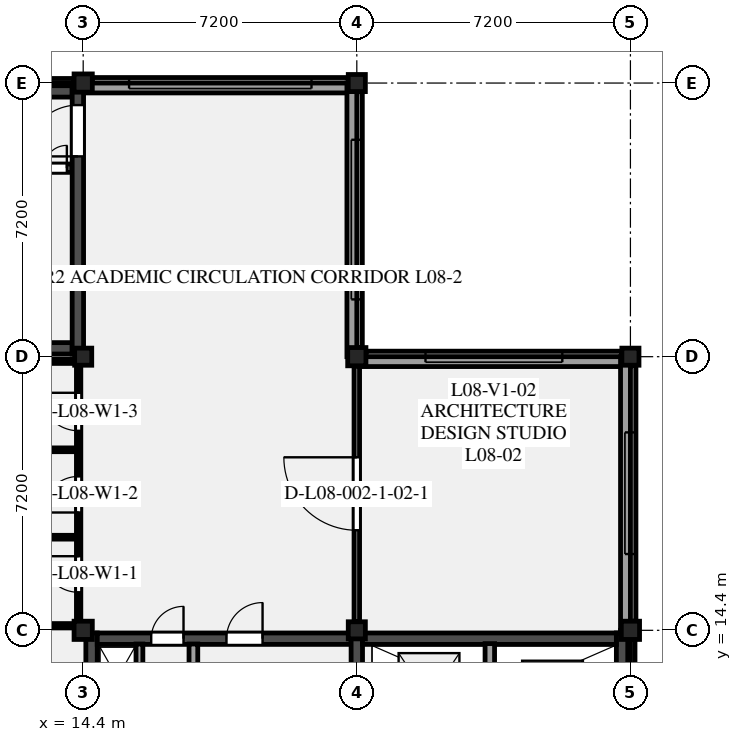
"""IFC4 building model, lengths in metres.
Left out: names, types, materials, properties, quantities, classifications, styles, units other than length and angle.
Written with IfcOpenShell. Run it as: python <this file> out.ifc"""

import sys

from ifc_helpers import new_model, si_unit, direction, frame, frame_2d, origin, origin_2d, place, context, subcontext, project, spatial, rectangle, extrude, element, fill, save


model = new_model("IFC4")
c1 = context("Model", 3, precision=1e-05, world=origin(), true_north=direction((0.0, 1.0)))
c2 = subcontext(c1, "Body", "Model", "MODEL_VIEW")
j1 = project(units=[si_unit("LENGTHUNIT", "METRE"), si_unit("PLANEANGLEUNIT", "RADIAN")], contexts=[c1])
p1 = place(None, origin())
s1 = spatial("IfcSite", under=j1, at=p1, CompositionType="ELEMENT")
p2 = place(p1, origin())
s2 = spatial("IfcBuilding", under=s1, at=p2, CompositionType="ELEMENT")
p3 = place(p2, frame((0.0, 0.0, 34.5)))
s3 = spatial("IfcBuildingStorey", under=s2, at=p3, CompositionType="ELEMENT", Elevation=34.5)
p4 = place(p3, frame((14.4, 14.4, 0.0), z_axis=(0.0, 0.0, 1.0), x_axis=(1.0, 0.0, 0.0)))
e1 = element("IfcColumn", 1, at=p4, inside=s3, PredefinedType="COLUMN", context=c2, shape_type="SweptSolid", body=[
    extrude(rectangle(XDim=0.48, YDim=0.48, at=origin_2d()), origin(), (0.0, 0.0, 1.0), 3.695),
])
p5 = place(p3, frame((14.4, 21.6, 0.0), z_axis=(0.0, 0.0, 1.0), x_axis=(1.0, 0.0, 0.0)))
e2 = element("IfcColumn", 2, at=p5, inside=s3, PredefinedType="COLUMN", context=c2, shape_type="SweptSolid", body=[
    extrude(rectangle(XDim=0.45, YDim=0.45, at=origin_2d()), origin(), (0.0, 0.0, 1.0), 3.695),
])
p6 = place(p3, frame((14.4, 28.8, 0.0), z_axis=(0.0, 0.0, 1.0), x_axis=(1.0, 0.0, 0.0)))
e3 = element("IfcColumn", 3, at=p6, inside=s3, PredefinedType="COLUMN", context=c2, shape_type="SweptSolid", body=[
    extrude(rectangle(XDim=0.48, YDim=0.48, at=origin_2d()), origin(), (0.0, 0.0, 1.0), 3.695),
])
p7 = place(p3, frame((21.6, 14.4, 0.0), z_axis=(0.0, 0.0, 1.0), x_axis=(1.0, 0.0, 0.0)))
e4 = element("IfcColumn", 4, at=p7, inside=s3, PredefinedType="COLUMN", context=c2, shape_type="SweptSolid", body=[
    extrude(rectangle(XDim=0.45, YDim=0.45, at=origin_2d()), origin(), (0.0, 0.0, 1.0), 3.695),
])
p8 = place(p3, frame((21.6, 21.6, 0.0), z_axis=(0.0, 0.0, 1.0), x_axis=(1.0, 0.0, 0.0)))
e5 = element("IfcColumn", 5, at=p8, inside=s3, PredefinedType="COLUMN", context=c2, shape_type="SweptSolid", body=[
    extrude(rectangle(XDim=0.48, YDim=0.48, at=origin_2d()), origin(), (0.0, 0.0, 1.0), 3.695),
])
p9 = place(p3, frame((21.6, 28.8, 0.0), z_axis=(0.0, 0.0, 1.0), x_axis=(1.0, 0.0, 0.0)))
e6 = element("IfcColumn", 6, at=p9, inside=s3, PredefinedType="COLUMN", context=c2, shape_type="SweptSolid", body=[
    extrude(rectangle(XDim=0.45, YDim=0.45, at=origin_2d()), origin(), (0.0, 0.0, 1.0), 3.695),
])
p10 = place(p3, frame((28.8, 14.4, 0.0), z_axis=(0.0, 0.0, 1.0), x_axis=(1.0, 0.0, 0.0)))
e7 = element("IfcColumn", 7, at=p10, inside=s3, PredefinedType="COLUMN", context=c2, shape_type="SweptSolid", body=[
    extrude(rectangle(XDim=0.48, YDim=0.48, at=origin_2d()), origin(), (0.0, 0.0, 1.0), 3.695),
])
p11 = place(p3, frame((28.8, 21.6, 0.0), z_axis=(0.0, 0.0, 1.0), x_axis=(1.0, 0.0, 0.0)))
e8 = element("IfcColumn", 8, at=p11, inside=s3, PredefinedType="COLUMN", context=c2, shape_type="SweptSolid", body=[
    extrude(rectangle(XDim=0.45, YDim=0.45, at=origin_2d()), origin(), (0.0, 0.0, 1.0), 3.695),
])
p12 = place(p3, frame((7.425, 28.8, 0.0), z_axis=(0.0, 0.0, 1.0), x_axis=(1.0, 0.0, 0.0)))
e9 = element("IfcWall", 9, at=p12, inside=s3, PredefinedType="STANDARD", context=c2, shape_type="SweptSolid", body=[
    extrude(rectangle(XDim=6.735, YDim=0.24, at=frame_2d((3.367, 0.0))), origin(), (0.0, 0.0, 1.0), 2.89),
])
p13 = place(p3, frame((14.64, 28.8, 0.0), z_axis=(0.0, 0.0, 1.0), x_axis=(1.0, 0.0, 0.0)))
e10 = element("IfcWall", 10, at=p13, inside=s3, PredefinedType="STANDARD", context=c2, shape_type="SweptSolid", body=[
    extrude(rectangle(XDim=6.735, YDim=0.29, at=frame_2d((3.368, 0.0))), origin(), (0.0, 0.0, 1.0), 2.89),
])
p14 = place(p13, frame((0.968, 0.0, 0.98)))
e11 = element("IfcOpeningElement", 11, at=p14, cuts=e10, PredefinedType="OPENING", context=c2, shape_type="SweptSolid", body=[
    extrude(rectangle(XDim=4.8, YDim=1.5, at=frame_2d((2.4, 0.75))), frame((0.0, 0.155, 0.0), z_axis=(0.0, -1.0, 0.0), x_axis=(1.0, 0.0, 0.0)), (0.0, 0.0, 1.0), 0.31),
])
p15 = place(p3, frame((21.6, 28.575, 0.0), z_axis=(0.0, 0.0, 1.0), x_axis=(0.0, -1.0, 0.0)))
e12 = element("IfcWall", 12, at=p15, inside=s3, PredefinedType="STANDARD", context=c2, shape_type="SweptSolid", body=[
    extrude(rectangle(XDim=6.735, YDim=0.29, at=frame_2d((3.367, 0.0))), origin(), (0.0, 0.0, 1.0), 2.89),
])
p16 = place(p15, frame((1.268, 0.0, 0.98)))
e13 = element("IfcOpeningElement", 13, at=p16, cuts=e12, PredefinedType="OPENING", context=c2, shape_type="SweptSolid", body=[
    extrude(rectangle(XDim=4.2, YDim=1.5, at=frame_2d((2.1, 0.75))), frame((0.0, 0.155, 0.0), z_axis=(0.0, -1.0, 0.0), x_axis=(1.0, 0.0, 0.0)), (0.0, 0.0, 1.0), 0.31),
])
p17 = place(p3, frame((21.84, 21.6, 0.0), z_axis=(0.0, 0.0, 1.0), x_axis=(1.0, 0.0, 0.0)))
e14 = element("IfcWall", 14, at=p17, inside=s3, PredefinedType="STANDARD", context=c2, shape_type="SweptSolid", body=[
    extrude(rectangle(XDim=6.735, YDim=0.29, at=frame_2d((3.367, 0.0))), origin(), (0.0, 0.0, 1.0), 2.89),
])
p18 = place(p17, frame((1.567, 0.0, 0.98)))
e15 = element("IfcOpeningElement", 15, at=p18, cuts=e14, PredefinedType="OPENING", context=c2, shape_type="SweptSolid", body=[
    extrude(rectangle(XDim=3.6, YDim=1.5, at=frame_2d((1.8, 0.75))), frame((0.0, 0.155, 0.0), z_axis=(0.0, -1.0, 0.0), x_axis=(1.0, 0.0, 0.0)), (0.0, 0.0, 1.0), 0.31),
])
p19 = place(p3, frame((28.8, 21.375, 0.0), z_axis=(0.0, 0.0, 1.0), x_axis=(0.0, -1.0, 0.0)))
e16 = element("IfcWall", 16, at=p19, inside=s3, PredefinedType="STANDARD", context=c2, shape_type="SweptSolid", body=[
    extrude(rectangle(XDim=6.735, YDim=0.29, at=frame_2d((3.368, 0.0))), origin(), (0.0, 0.0, 1.0), 2.89),
])
p20 = place(p19, frame((1.768, 0.0, 0.98)))
e17 = element("IfcOpeningElement", 17, at=p20, cuts=e16, PredefinedType="OPENING", context=c2, shape_type="SweptSolid", body=[
    extrude(rectangle(XDim=3.2, YDim=1.45, at=frame_2d((1.6, 0.725))), frame((0.0, 0.155, 0.0), z_axis=(0.0, -1.0, 0.0), x_axis=(1.0, 0.0, 0.0)), (0.0, 0.0, 1.0), 0.31),
])
p21 = place(p3, frame((28.8, 14.16, 0.0), z_axis=(0.0, 0.0, 1.0), x_axis=(0.0, -1.0, 0.0)))
e18 = element("IfcWall", 18, at=p21, inside=s3, PredefinedType="STANDARD", context=c2, shape_type="SweptSolid", body=[
    extrude(rectangle(XDim=6.735, YDim=0.24, at=frame_2d((3.367, 0.0))), origin(), (0.0, 0.0, 1.0), 2.89),
])
p22 = place(p3, frame((7.2, 28.67, 3.9), z_axis=(0.0, 0.0, 1.0), x_axis=(1.0, 0.0, 0.0)))
e19 = element("IfcWall", 19, at=p22, inside=s3, PredefinedType="PARAPET", context=c2, shape_type="SweptSolid", body=[
    extrude(rectangle(XDim=7.2, YDim=0.26, at=frame_2d((3.6, 0.0))), origin(), (0.0, 0.0, 1.0), 0.9),
])
p23 = place(p3, frame((14.4, 28.67, 3.695), z_axis=(0.0, 0.0, 1.0), x_axis=(1.0, 0.0, 0.0)))
e20 = element("IfcWall", 20, at=p23, inside=s3, PredefinedType="PARAPET", context=c2, shape_type="SweptSolid", body=[
    extrude(rectangle(XDim=7.2, YDim=0.26, at=frame_2d((3.6, 0.0))), origin(), (0.0, 0.0, 1.0), 1.105),
])
for number, where, z_axis, x_axis in (
    (21, (21.47, 28.8, 3.695), (0.0, 0.0, 1.0), (0.0, -1.0, 0.0)),
    (22, (21.6, 21.47, 3.695), (0.0, 0.0, 1.0), (1.0, 0.0, 0.0)),
):
    element("IfcWall", number, at=place(p3, frame(where, z_axis=z_axis, x_axis=x_axis)), inside=s3, PredefinedType="PARAPET", context=c2, shape_type="SweptSolid", body=[
        extrude(rectangle(XDim=7.2, YDim=0.26, at=frame_2d((3.6, 0.0))), origin(), (0.0, 0.0, 1.0), 1.105),
    ])
p24 = place(p3, frame((28.67, 21.6, 3.695), z_axis=(0.0, 0.0, 1.0), x_axis=(0.0, -1.0, 0.0)))
e23 = element("IfcWall", 23, at=p24, inside=s3, PredefinedType="PARAPET", context=c2, shape_type="SweptSolid", body=[
    extrude(rectangle(XDim=7.2, YDim=0.26, at=frame_2d((3.6, 0.0))), origin(), (0.0, 0.0, 1.0), 1.105),
])
p25 = place(p3, frame((28.67, 14.4, 3.9), z_axis=(0.0, 0.0, 1.0), x_axis=(0.0, -1.0, 0.0)))
e24 = element("IfcWall", 24, at=p25, inside=s3, PredefinedType="PARAPET", context=c2, shape_type="SweptSolid", body=[
    extrude(rectangle(XDim=7.2, YDim=0.26, at=frame_2d((3.6, 0.0))), origin(), (0.0, 0.0, 1.0), 0.9),
])
p26 = place(p3, frame((14.62, 14.33, 0.0), z_axis=(0.0, 0.0, 1.0), x_axis=(0.0, -1.0, 0.0)))
e25 = element("IfcWall", 25, at=p26, inside=s3, PredefinedType="SHEAR", context=c2, shape_type="SweptSolid", body=[
    extrude(rectangle(XDim=7.06, YDim=0.3, at=frame_2d((3.53, 0.0))), origin(), (0.0, 0.0, 1.0), 3.9),
])
p27 = place(p3, frame((14.77, 14.18, 0.0), z_axis=(0.0, 0.0, 1.0), x_axis=(1.0, 0.0, 0.0)))
e26 = element("IfcWall", 26, at=p27, inside=s3, PredefinedType="SHEAR", context=c2, shape_type="SweptSolid", body=[
    extrude(rectangle(XDim=6.68, YDim=0.3, at=frame_2d((3.34, 0.0))), origin(), (0.0, 0.0, 1.0), 3.9),
])
p28 = place(p27, frame((1.42, 0.0, 0.0)))
e27 = element("IfcOpeningElement", 27, at=p28, cuts=e26, PredefinedType="OPENING", context=c2, shape_type="SweptSolid", body=[
    extrude(rectangle(XDim=0.85, YDim=2.1, at=frame_2d((0.425, 1.05))), frame((0.0, 0.16, 0.0), z_axis=(0.0, -1.0, 0.0), x_axis=(1.0, 0.0, 0.0)), (0.0, 0.0, 1.0), 0.32),
])
p29 = place(p27, frame((3.4, 0.0, 0.0)))
e28 = element("IfcOpeningElement", 28, at=p29, cuts=e26, PredefinedType="OPENING", context=c2, shape_type="SweptSolid", body=[
    extrude(rectangle(XDim=0.95, YDim=2.15, at=frame_2d((0.475, 1.075))), frame((0.0, 0.16, 0.0), z_axis=(0.0, -1.0, 0.0), x_axis=(1.0, 0.0, 0.0)), (0.0, 0.0, 1.0), 0.32),
])
p30 = place(p3, frame((17.3, 12.3, 0.0), z_axis=(0.0, 0.0, 1.0), x_axis=(0.0, 1.0, 0.0)))
e29 = element("IfcWall", 29, at=p30, inside=s3, PredefinedType="PARTITIONING", context=c2, shape_type="SweptSolid", body=[
    extrude(rectangle(XDim=1.74, YDim=0.23, at=frame_2d((0.87, 0.0))), origin(), (0.0, 0.0, 1.0), 3.9),
])
p31 = place(p3, frame((15.88, 12.28, 0.0), z_axis=(0.0, 0.0, 1.0), x_axis=(0.0, 1.0, 0.0)))
e30 = element("IfcWall", 30, at=p31, inside=s3, PredefinedType="PARTITIONING", context=c2, shape_type="SweptSolid", body=[
    extrude(rectangle(XDim=1.76, YDim=0.18, at=frame_2d((0.88, 0.0))), origin(), (0.0, 0.0, 1.0), 3.9),
])
p32 = place(p3, frame((21.6, 7.27, 0.0), z_axis=(0.0, 0.0, 1.0), x_axis=(0.0, 1.0, 0.0)))
e31 = element("IfcWall", 31, at=p32, inside=s3, PredefinedType="SHEAR", context=c2, shape_type="SweptSolid", body=[
    extrude(rectangle(XDim=7.06, YDim=0.3, at=frame_2d((3.53, 0.0))), origin(), (0.0, 0.0, 1.0), 3.9),
])
p33 = place(p32, frame((1.4, 0.0, 0.0)))
e32 = element("IfcOpeningElement", 32, at=p33, cuts=e31, PredefinedType="OPENING", context=c2, shape_type="SweptSolid", body=[
    extrude(rectangle(XDim=1.8, YDim=2.2, at=frame_2d((0.9, 1.1))), frame((0.0, 0.16, 0.0), z_axis=(0.0, -1.0, 0.0), x_axis=(1.0, 0.0, 0.0)), (0.0, 0.0, 1.0), 0.32),
])
p34 = place(p3, frame((28.58, 7.27, 0.0), z_axis=(0.0, 0.0, 1.0), x_axis=(0.0, 1.0, 0.0)))
e33 = element("IfcWall", 33, at=p34, inside=s3, PredefinedType="SHEAR", context=c2, shape_type="SweptSolid", body=[
    extrude(rectangle(XDim=7.06, YDim=0.3, at=frame_2d((3.53, 0.0))), origin(), (0.0, 0.0, 1.0), 3.9),
])
p35 = place(p3, frame((21.75, 14.18, 0.0), z_axis=(0.0, 0.0, 1.0), x_axis=(1.0, 0.0, 0.0)))
e34 = element("IfcWall", 34, at=p35, inside=s3, PredefinedType="SHEAR", context=c2, shape_type="SweptSolid", body=[
    extrude(rectangle(XDim=6.68, YDim=0.3, at=frame_2d((3.34, 0.0))), origin(), (0.0, 0.0, 1.0), 3.9),
])
p36 = place(p3, frame((25.1, 11.18, 0.0), z_axis=(0.0, 0.0, 1.0), x_axis=(0.0, 1.0, 0.0)))
e35 = element("IfcWall", 35, at=p36, inside=s3, PredefinedType="PARTITIONING", context=c2, shape_type="SweptSolid", body=[
    extrude(rectangle(XDim=2.87, YDim=0.25, at=frame_2d((1.435, 0.0))), origin(), (0.0, 0.0, 1.0), 3.9),
])
for number, where, z_axis, x_axis in (
    (36, (7.57, 21.82, 0.0), (0.0, 0.0, 1.0), (1.0, 0.0, 0.0)),
    (37, (7.57, 28.58, 0.0), (0.0, 0.0, 1.0), (1.0, 0.0, 0.0)),
):
    element("IfcWall", number, at=place(p3, frame(where, z_axis=z_axis, x_axis=x_axis)), inside=s3, PredefinedType="SHEAR", context=c2, shape_type="SweptSolid", body=[
        extrude(rectangle(XDim=6.54, YDim=0.3, at=frame_2d((3.27, 0.0))), origin(), (0.0, 0.0, 1.0), 3.9),
    ])
p37 = place(p3, frame((7.57, 26.56, 0.0), z_axis=(0.0, 0.0, 1.0), x_axis=(1.0, 0.0, 0.0)))
e38 = element("IfcWall", 38, at=p37, inside=s3, PredefinedType="SHEAR", context=c2, shape_type="SweptSolid", body=[
    extrude(rectangle(XDim=6.54, YDim=0.22, at=frame_2d((3.27, 0.0))), origin(), (0.0, 0.0, 1.0), 3.9),
])
p38 = place(p37, frame((5.2, 0.0, 0.0)))
e39 = element("IfcOpeningElement", 39, at=p38, cuts=e38, PredefinedType="OPENING", context=c2, shape_type="SweptSolid", body=[
    extrude(rectangle(XDim=1.2, YDim=2.2, at=frame_2d((0.6, 1.1))), frame((0.0, 0.12, 0.0), z_axis=(0.0, -1.0, 0.0), x_axis=(1.0, 0.0, 0.0)), (0.0, 0.0, 1.0), 0.24),
])
p39 = place(p3, frame((14.26, 21.67, 0.0), z_axis=(0.0, 0.0, 1.0), x_axis=(0.0, 1.0, 0.0)))
e40 = element("IfcWall", 40, at=p39, inside=s3, PredefinedType="SHEAR", context=c2, shape_type="SweptSolid", body=[
    extrude(rectangle(XDim=7.06, YDim=0.3, at=frame_2d((3.53, 0.0))), origin(), (0.0, 0.0, 1.0), 3.9),
])
p40 = place(p39, frame((5.2, 0.0, 0.0)))
e41 = element("IfcOpeningElement", 41, at=p40, cuts=e40, PredefinedType="OPENING", context=c2, shape_type="SweptSolid", body=[
    extrude(rectangle(XDim=1.35, YDim=2.15, at=frame_2d((0.675, 1.075))), frame((0.0, 0.16, 0.0), z_axis=(0.0, -1.0, 0.0), x_axis=(1.0, 0.0, 0.0)), (0.0, 0.0, 1.0), 0.32),
])
p41 = place(p3, frame((7.43, 14.52, 0.0), z_axis=(0.0, 0.0, 1.0), x_axis=(1.0, 0.0, 0.0)))
e42 = element("IfcWall", 42, at=p41, inside=s3, PredefinedType="PARTITIONING", context=c2, shape_type="SweptSolid", body=[
    extrude(rectangle(XDim=6.725, YDim=0.115, at=frame_2d((3.363, 0.0))), origin(), (0.0, 0.0, 1.0), 2.89),
])
p42 = place(p3, frame((7.445, 21.48, 0.0), z_axis=(0.0, 0.0, 1.0), x_axis=(1.0, 0.0, 0.0)))
e43 = element("IfcWall", 43, at=p42, inside=s3, PredefinedType="PARTITIONING", context=c2, shape_type="SweptSolid", body=[
    extrude(rectangle(XDim=6.725, YDim=0.115, at=frame_2d((3.362, 0.0))), origin(), (0.0, 0.0, 1.0), 2.89),
])
p43 = place(p3, frame((14.28, 14.645, 0.0), z_axis=(0.0, 0.0, 1.0), x_axis=(0.0, 1.0, 0.0)))
e44 = element("IfcWall", 44, at=p43, inside=s3, PredefinedType="PARTITIONING", context=c2, shape_type="SweptSolid", body=[
    extrude(rectangle(XDim=6.725, YDim=0.115, at=frame_2d((3.363, 0.0))), origin(), (0.0, 0.0, 1.0), 2.89),
])
p44 = place(p43, frame((0.755, 0.0, 0.0)))
e45 = element("IfcOpeningElement", 45, at=p44, cuts=e44, PredefinedType="OPENING", context=c2, shape_type="SweptSolid", body=[
    extrude(rectangle(XDim=0.95, YDim=2.1, at=frame_2d((0.475, 1.05))), frame((0.0, 0.067, 0.0), z_axis=(0.0, -1.0, 0.0), x_axis=(1.0, 0.0, 0.0)), (0.0, 0.0, 1.0), 0.135),
])
p45 = place(p43, frame((2.855, 0.0, 0.0)))
e46 = element("IfcOpeningElement", 46, at=p45, cuts=e44, PredefinedType="OPENING", context=c2, shape_type="SweptSolid", body=[
    extrude(rectangle(XDim=0.95, YDim=2.1, at=frame_2d((0.475, 1.05))), frame((0.0, 0.067, 0.0), z_axis=(0.0, -1.0, 0.0), x_axis=(1.0, 0.0, 0.0)), (0.0, 0.0, 1.0), 0.135),
])
p46 = place(p43, frame((5.005, 0.0, 0.0)))
e47 = element("IfcOpeningElement", 47, at=p46, cuts=e44, PredefinedType="OPENING", context=c2, shape_type="SweptSolid", body=[
    extrude(rectangle(XDim=1.0, YDim=2.15, at=frame_2d((0.5, 1.075))), frame((0.0, 0.067, 0.0), z_axis=(0.0, -1.0, 0.0), x_axis=(1.0, 0.0, 0.0)), (0.0, 0.0, 1.0), 0.135),
])
for number, where, z_axis, x_axis in (
    (48, (7.4, 16.85, 0.0), (0.0, 0.0, 1.0), (1.0, 0.0, 0.0)),
    (49, (7.4, 19.15, 0.0), (0.0, 0.0, 1.0), (1.0, 0.0, 0.0)),
):
    element("IfcWall", number, at=place(p3, frame(where, z_axis=z_axis, x_axis=x_axis)), inside=s3, PredefinedType="PARTITIONING", context=c2, shape_type="SweptSolid", body=[
        extrude(rectangle(XDim=6.8, YDim=0.1, at=frame_2d((3.4, 0.0))), origin(), (0.0, 0.0, 1.0), 3.9),
    ])
p47 = place(p3, frame((21.6, 14.63, 0.0), z_axis=(0.0, 0.0, 1.0), x_axis=(0.0, 1.0, 0.0)))
e50 = element("IfcWall", 50, at=p47, inside=s3, PredefinedType="PARTITIONING", context=c2, shape_type="SweptSolid", body=[
    extrude(rectangle(XDim=6.725, YDim=0.145, at=frame_2d((3.363, 0.0))), origin(), (0.0, 0.0, 1.0), 2.89),
])
p48 = place(p47, frame((2.403, 0.0, 0.0)))
e51 = element("IfcOpeningElement", 51, at=p48, cuts=e50, PredefinedType="OPENING", context=c2, shape_type="SweptSolid", body=[
    extrude(rectangle(XDim=1.92, YDim=2.35, at=frame_2d((0.96, 1.175))), frame((0.0, 0.083, 0.0), z_axis=(0.0, -1.0, 0.0), x_axis=(1.0, 0.0, 0.0)), (0.0, 0.0, 1.0), 0.165),
])
p49 = place(p14, origin())
e52 = element("IfcWindow", 52, at=p49, inside=s3, PartitioningType="SINGLE_PANEL", PredefinedType="WINDOW", context=c2, shape_type="SweptSolid", body=[
    extrude(rectangle(XDim=4.8, YDim=1.5, at=frame_2d((2.4, 0.75))), frame((0.0, -0.03, 0.0), z_axis=(0.0, -1.0, 0.0), x_axis=(1.0, 0.0, 0.0)), (0.0, 0.0, 1.0), 0.06),
])
fill(e11, e52)
p50 = place(p16, origin())
e53 = element("IfcWindow", 53, at=p50, inside=s3, PartitioningType="SINGLE_PANEL", PredefinedType="WINDOW", context=c2, shape_type="SweptSolid", body=[
    extrude(rectangle(XDim=4.2, YDim=1.5, at=frame_2d((2.1, 0.75))), frame((0.0, -0.03, 0.0), z_axis=(0.0, -1.0, 0.0), x_axis=(1.0, 0.0, 0.0)), (0.0, 0.0, 1.0), 0.06),
])
fill(e13, e53)
p51 = place(p18, origin())
e54 = element("IfcWindow", 54, at=p51, inside=s3, PartitioningType="SINGLE_PANEL", PredefinedType="WINDOW", context=c2, shape_type="SweptSolid", body=[
    extrude(rectangle(XDim=3.6, YDim=1.5, at=frame_2d((1.8, 0.75))), frame((0.0, -0.03, 0.0), z_axis=(0.0, -1.0, 0.0), x_axis=(1.0, 0.0, 0.0)), (0.0, 0.0, 1.0), 0.06),
])
fill(e15, e54)
p52 = place(p20, origin())
e55 = element("IfcWindow", 55, at=p52, inside=s3, PartitioningType="SINGLE_PANEL", PredefinedType="WINDOW", context=c2, shape_type="SweptSolid", body=[
    extrude(rectangle(XDim=3.2, YDim=1.45, at=frame_2d((1.6, 0.725))), frame((0.0, -0.03, 0.0), z_axis=(0.0, -1.0, 0.0), x_axis=(1.0, 0.0, 0.0)), (0.0, 0.0, 1.0), 0.06),
])
fill(e17, e55)
p53 = place(p28, origin())
e56 = element("IfcDoor", 56, at=p53, inside=s3, OperationType="SINGLE_SWING_RIGHT", PredefinedType="DOOR", context=c2, shape_type="SweptSolid", body=[
    extrude(rectangle(XDim=0.85, YDim=2.1, at=frame_2d((0.425, 1.05))), frame((0.0, 0.025, 0.0), z_axis=(0.0, -1.0, 0.0), x_axis=(1.0, 0.0, 0.0)), (0.0, 0.0, 1.0), 0.05),
])
fill(e27, e56)
p54 = place(p29, origin())
e57 = element("IfcDoor", 57, at=p54, inside=s3, OperationType="SINGLE_SWING_RIGHT", PredefinedType="DOOR", context=c2, shape_type="SweptSolid", body=[
    extrude(rectangle(XDim=0.95, YDim=2.15, at=frame_2d((0.475, 1.075))), frame((0.0, 0.025, 0.0), z_axis=(0.0, -1.0, 0.0), x_axis=(1.0, 0.0, 0.0)), (0.0, 0.0, 1.0), 0.05),
])
fill(e28, e57)
p55 = place(p38, origin())
e58 = element("IfcDoor", 58, at=p55, inside=s3, OperationType="DOUBLE_DOOR_SINGLE_SWING", PredefinedType="DOOR", context=c2, shape_type="SweptSolid", body=[
    extrude(rectangle(XDim=1.2, YDim=2.2, at=frame_2d((0.6, 1.1))), frame((0.0, 0.025, 0.0), z_axis=(0.0, -1.0, 0.0), x_axis=(1.0, 0.0, 0.0)), (0.0, 0.0, 1.0), 0.05),
])
fill(e39, e58)
p56 = place(p40, origin())
e59 = element("IfcDoor", 59, at=p56, inside=s3, OperationType="SINGLE_SWING_LEFT", PredefinedType="DOOR", context=c2, shape_type="SweptSolid", body=[
    extrude(rectangle(XDim=1.35, YDim=2.15, at=frame_2d((0.675, 1.075))), frame((0.0, 0.025, 0.0), z_axis=(0.0, -1.0, 0.0), x_axis=(1.0, 0.0, 0.0)), (0.0, 0.0, 1.0), 0.05),
])
fill(e41, e59)
p57 = place(p44, origin())
e60 = element("IfcDoor", 60, at=p57, inside=s3, OperationType="SINGLE_SWING_RIGHT", PredefinedType="DOOR", context=c2, shape_type="SweptSolid", body=[
    extrude(rectangle(XDim=0.95, YDim=2.1, at=frame_2d((0.475, 1.05))), frame((0.0, 0.025, 0.0), z_axis=(0.0, -1.0, 0.0), x_axis=(1.0, 0.0, 0.0)), (0.0, 0.0, 1.0), 0.05),
])
fill(e45, e60)
p58 = place(p45, origin())
e61 = element("IfcDoor", 61, at=p58, inside=s3, OperationType="SINGLE_SWING_LEFT", PredefinedType="DOOR", context=c2, shape_type="SweptSolid", body=[
    extrude(rectangle(XDim=0.95, YDim=2.1, at=frame_2d((0.475, 1.05))), frame((0.0, 0.025, 0.0), z_axis=(0.0, -1.0, 0.0), x_axis=(1.0, 0.0, 0.0)), (0.0, 0.0, 1.0), 0.05),
])
fill(e46, e61)
p59 = place(p46, origin())
e62 = element("IfcDoor", 62, at=p59, inside=s3, OperationType="SINGLE_SWING_RIGHT", PredefinedType="DOOR", context=c2, shape_type="SweptSolid", body=[
    extrude(rectangle(XDim=1.0, YDim=2.15, at=frame_2d((0.5, 1.075))), frame((0.0, 0.025, 0.0), z_axis=(0.0, -1.0, 0.0), x_axis=(1.0, 0.0, 0.0)), (0.0, 0.0, 1.0), 0.05),
])
fill(e47, e62)
p60 = place(p48, origin())
e63 = element("IfcDoor", 63, at=p60, inside=s3, OperationType="SINGLE_SWING_RIGHT", PredefinedType="DOOR", context=c2, shape_type="SweptSolid", body=[
    extrude(rectangle(XDim=1.92, YDim=2.35, at=frame_2d((0.96, 1.175))), frame((0.0, 0.025, 0.0), z_axis=(0.0, -1.0, 0.0), x_axis=(1.0, 0.0, 0.0)), (0.0, 0.0, 1.0), 0.05),
])
fill(e51, e63)
save(model, sys.argv[1])
